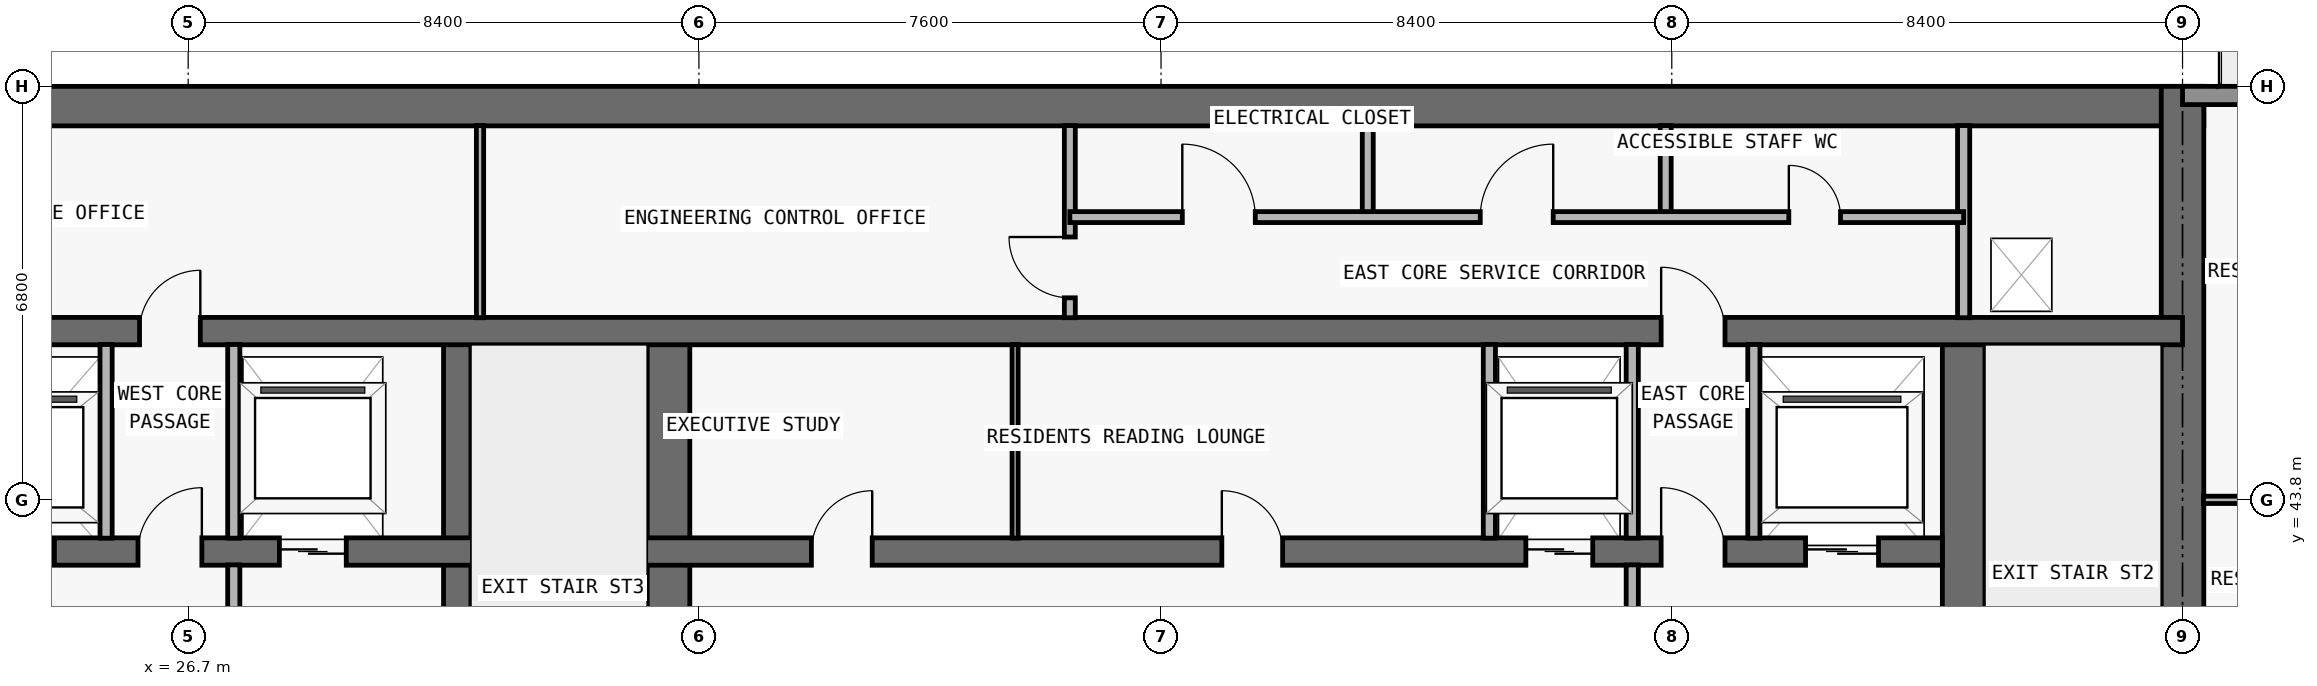
"""IFC4 building model, lengths in metres.
Left out: names, types, materials, properties, quantities, classifications, styles, units other than length and angle.
Written with IfcOpenShell. Run it as: python <this file> out.ifc"""

import sys

from ifc_helpers import new_model, si_unit, direction, frame, frame_2d, origin, place, context, subcontext, project, spatial, rectangle, extrude, element, fill, save


model = new_model("IFC4")
c1 = context("Model", 3, precision=1e-05, world=origin(), true_north=direction((0.0, 1.0)))
c2 = subcontext(c1, "Body", "Model", "MODEL_VIEW")
j1 = project(units=[si_unit("LENGTHUNIT", "METRE"), si_unit("PLANEANGLEUNIT", "RADIAN")], contexts=[c1])
p1 = place(None, origin())
s1 = spatial("IfcSite", under=j1, at=p1, CompositionType="ELEMENT")
p2 = place(p1, origin())
s2 = spatial("IfcBuilding", under=s1, at=p2, CompositionType="ELEMENT")
p3 = place(p2, frame((0.0, 0.0, 266.1)))
s3 = spatial("IfcBuildingStorey", under=s2, at=p3, CompositionType="ELEMENT", Elevation=266.1)
p4 = place(p3, frame((17.95, 50.275, 0.0), z_axis=(0.0, 0.0, 1.0), x_axis=(1.0, 0.0, 0.0)))
e1 = element("IfcWall", 1, at=p4, inside=s3, PredefinedType="SHEAR", context=c2, shape_type="SweptSolid", body=[
    extrude(rectangle(XDim=41.9, YDim=0.65, at=frame_2d((20.95, 0.0))), origin(), (0.0, 0.0, 1.0), 3.0),
])
p5 = place(p3, frame((59.5, 36.65, 0.0), z_axis=(0.0, 0.0, 1.0), x_axis=(0.0, 1.0, 0.0)))
e2 = element("IfcWall", 2, at=p5, inside=s3, PredefinedType="SHEAR", context=c2, shape_type="SweptSolid", body=[
    extrude(rectangle(XDim=13.95, YDim=0.7, at=frame_2d((6.975, 0.0))), origin(), (0.0, 0.0, 1.0), 3.0),
])
p6 = place(p3, frame((55.9, 37.0, 0.0), z_axis=(0.0, 0.0, 1.0), x_axis=(0.0, 1.0, 0.0)))
e3 = element("IfcWall", 3, at=p6, inside=s3, PredefinedType="SHEAR", context=c2, shape_type="SweptSolid", body=[
    extrude(rectangle(XDim=9.575, YDim=0.7, at=frame_2d((4.788, 0.0))), origin(), (0.0, 0.0, 1.0), 3.0),
])
p7 = place(p6, frame((0.55, 0.0, 0.0)))
e4 = element("IfcOpeningElement", 4, at=p7, cuts=e3, PredefinedType="OPENING", context=c2, shape_type="SweptSolid", body=[
    extrude(rectangle(XDim=1.1, YDim=2.15, at=frame_2d((0.55, 1.075))), frame((0.0, 0.36, 0.0), z_axis=(0.0, -1.0, 0.0), x_axis=(1.0, 0.0, 0.0)), (0.0, 0.0, 1.0), 0.72),
])
p8 = place(p3, frame((31.125, 37.0, 0.0), z_axis=(0.0, 0.0, 1.0), x_axis=(0.0, 1.0, 0.0)))
e5 = element("IfcWall", 5, at=p8, inside=s3, PredefinedType="SHEAR", context=c2, shape_type="SweptSolid", body=[
    extrude(rectangle(XDim=9.575, YDim=0.45, at=frame_2d((4.788, 0.0))), origin(), (0.0, 0.0, 1.0), 3.0),
])
p9 = place(p3, frame((34.6, 37.0, 0.0), z_axis=(0.0, 0.0, 1.0), x_axis=(0.0, 1.0, 0.0)))
e6 = element("IfcWall", 6, at=p9, inside=s3, PredefinedType="SHEAR", context=c2, shape_type="SweptSolid", body=[
    extrude(rectangle(XDim=9.575, YDim=0.7, at=frame_2d((4.788, 0.0))), origin(), (0.0, 0.0, 1.0), 3.0),
])
p10 = place(p3, frame((22.25, 42.95, 0.0), z_axis=(0.0, 0.0, 1.0), x_axis=(1.0, 0.0, 0.0)))
e7 = element("IfcWall", 7, at=p10, inside=s3, PredefinedType="SHEAR", context=c2, shape_type="SweptSolid", body=[
    extrude(rectangle(XDim=33.3, YDim=0.45, at=frame_2d((16.65, 0.0))), origin(), (0.0, 0.0, 1.0), 3.0),
])
p11 = place(p10, frame((1.05, 0.0, 0.0)))
e8 = element("IfcOpeningElement", 8, at=p11, cuts=e7, PredefinedType="OPENING", context=c2, shape_type="SweptSolid", body=[
    extrude(rectangle(XDim=1.2, YDim=2.2, at=frame_2d((0.6, 1.1))), frame((0.0, 0.235, 0.0), z_axis=(0.0, -1.0, 0.0), x_axis=(1.0, 0.0, 0.0)), (0.0, 0.0, 1.0), 0.47),
])
p12 = place(p10, frame((31.05, 0.0, 0.0)))
e9 = element("IfcOpeningElement", 9, at=p12, cuts=e7, PredefinedType="OPENING", context=c2, shape_type="SweptSolid", body=[
    extrude(rectangle(XDim=1.2, YDim=2.2, at=frame_2d((0.6, 1.1))), frame((0.0, 0.235, 0.0), z_axis=(0.0, -1.0, 0.0), x_axis=(1.0, 0.0, 0.0)), (0.0, 0.0, 1.0), 0.47),
])
p13 = place(p10, frame((26.45, 0.0, 0.0)))
e10 = element("IfcOpeningElement", 10, at=p13, cuts=e7, PredefinedType="OPENING", context=c2, shape_type="SweptSolid", body=[
    extrude(rectangle(XDim=1.1, YDim=2.2, at=frame_2d((0.55, 1.1))), frame((0.0, 0.235, 0.0), z_axis=(0.0, -1.0, 0.0), x_axis=(1.0, 0.0, 0.0)), (0.0, 0.0, 1.0), 0.47),
])
p14 = place(p10, frame((5.95, 0.0, 0.0)))
e11 = element("IfcOpeningElement", 11, at=p14, cuts=e7, PredefinedType="OPENING", context=c2, shape_type="SweptSolid", body=[
    extrude(rectangle(XDim=1.1, YDim=2.2, at=frame_2d((0.55, 1.1))), frame((0.0, 0.235, 0.0), z_axis=(0.0, -1.0, 0.0), x_axis=(1.0, 0.0, 0.0)), (0.0, 0.0, 1.0), 0.47),
])
p15 = place(p10, frame((3.625, 0.0, 0.0)))
e12 = element("IfcOpeningElement", 12, at=p15, cuts=e7, PredefinedType="OPENING", context=c2, shape_type="SweptSolid", body=[
    extrude(rectangle(XDim=1.05, YDim=2.15, at=frame_2d((0.525, 1.075))), frame((0.0, 0.235, 0.0), z_axis=(0.0, -1.0, 0.0), x_axis=(1.0, 0.0, 0.0)), (0.0, 0.0, 1.0), 0.47),
])
p16 = place(p10, frame((28.675, 0.0, 0.0)))
e13 = element("IfcOpeningElement", 13, at=p16, cuts=e7, PredefinedType="OPENING", context=c2, shape_type="SweptSolid", body=[
    extrude(rectangle(XDim=1.05, YDim=2.15, at=frame_2d((0.525, 1.075))), frame((0.0, 0.235, 0.0), z_axis=(0.0, -1.0, 0.0), x_axis=(1.0, 0.0, 0.0)), (0.0, 0.0, 1.0), 0.47),
])
p17 = place(p10, frame((14.7, 0.0, 0.0)))
e14 = element("IfcOpeningElement", 14, at=p17, cuts=e7, PredefinedType="OPENING", context=c2, shape_type="SweptSolid", body=[
    extrude(rectangle(XDim=1.0, YDim=2.2, at=frame_2d((0.5, 1.1))), frame((0.0, 0.235, 0.0), z_axis=(0.0, -1.0, 0.0), x_axis=(1.0, 0.0, 0.0)), (0.0, 0.0, 1.0), 0.47),
])
p18 = place(p10, frame((21.45, 0.0, 0.0)))
e15 = element("IfcOpeningElement", 15, at=p18, cuts=e7, PredefinedType="OPENING", context=c2, shape_type="SweptSolid", body=[
    extrude(rectangle(XDim=1.0, YDim=2.2, at=frame_2d((0.5, 1.1))), frame((0.0, 0.235, 0.0), z_axis=(0.0, -1.0, 0.0), x_axis=(1.0, 0.0, 0.0)), (0.0, 0.0, 1.0), 0.47),
])
p19 = place(p3, frame((18.3, 46.575, 0.0), z_axis=(0.0, 0.0, 1.0), x_axis=(1.0, 0.0, 0.0)))
e16 = element("IfcWall", 16, at=p19, inside=s3, PredefinedType="SHEAR", context=c2, shape_type="SweptSolid", body=[
    extrude(rectangle(XDim=41.2, YDim=0.45, at=frame_2d((20.6, 0.0))), origin(), (0.0, 0.0, 1.0), 3.0),
])
p20 = place(p19, frame((7.6, 0.0, 0.0)))
e17 = element("IfcOpeningElement", 17, at=p20, cuts=e16, PredefinedType="OPENING", context=c2, shape_type="SweptSolid", body=[
    extrude(rectangle(XDim=1.0, YDim=2.2, at=frame_2d((0.5, 1.1))), frame((0.0, 0.235, 0.0), z_axis=(0.0, -1.0, 0.0), x_axis=(1.0, 0.0, 0.0)), (0.0, 0.0, 1.0), 0.47),
])
p21 = place(p19, frame((32.625, 0.0, 0.0)))
e18 = element("IfcOpeningElement", 18, at=p21, cuts=e16, PredefinedType="OPENING", context=c2, shape_type="SweptSolid", body=[
    extrude(rectangle(XDim=1.05, YDim=2.15, at=frame_2d((0.525, 1.075))), frame((0.0, 0.235, 0.0), z_axis=(0.0, -1.0, 0.0), x_axis=(1.0, 0.0, 0.0)), (0.0, 0.0, 1.0), 0.47),
])
p22 = place(p3, frame((59.5, 50.45, 0.0), z_axis=(0.0, 0.0, 1.0), x_axis=(1.0, 0.0, 0.0)))
e19 = element("IfcWall", 19, at=p22, inside=s3, PredefinedType="STANDARD", context=c2, shape_type="SweptSolid", body=[
    extrude(rectangle(XDim=6.2, YDim=0.3, at=frame_2d((3.1, 0.0))), origin(), (0.0, 0.0, 1.0), 3.0),
])
p23 = place(p22, frame((2.1, 0.0, 0.0)))
e20 = element("IfcOpeningElement", 20, at=p23, cuts=e19, PredefinedType="OPENING", context=c2, shape_type="SweptSolid", body=[
    extrude(rectangle(XDim=2.0, YDim=2.3, at=frame_2d((1.0, 1.15))), frame((0.0, 0.16, 0.0), z_axis=(0.0, -1.0, 0.0), x_axis=(1.0, 0.0, 0.0)), (0.0, 0.0, 1.0), 0.32),
])
p24 = place(p3, frame((25.35, 43.17, 0.0), z_axis=(0.0, 0.0, 1.0), x_axis=(0.0, 1.0, 0.0)))
e21 = element("IfcWall", 21, at=p24, inside=s3, PredefinedType="PARTITIONING", context=c2, shape_type="SweptSolid", body=[
    extrude(rectangle(XDim=3.185, YDim=0.2, at=frame_2d((1.593, 0.0))), origin(), (0.0, 0.0, 1.0), 3.0),
])
p25 = place(p3, frame((27.45, 37.345, 0.0), z_axis=(0.0, 0.0, 1.0), x_axis=(0.0, 1.0, 0.0)))
e22 = element("IfcWall", 22, at=p25, inside=s3, PredefinedType="PARTITIONING", context=c2, shape_type="SweptSolid", body=[
    extrude(rectangle(XDim=5.385, YDim=0.2, at=frame_2d((2.692, 0.0))), origin(), (0.0, 0.0, 1.0), 3.0),
])
p26 = place(p3, frame((27.45, 43.17, 0.0), z_axis=(0.0, 0.0, 1.0), x_axis=(0.0, 1.0, 0.0)))
e23 = element("IfcWall", 23, at=p26, inside=s3, PredefinedType="PARTITIONING", context=c2, shape_type="SweptSolid", body=[
    extrude(rectangle(XDim=3.185, YDim=0.2, at=frame_2d((1.593, 0.0))), origin(), (0.0, 0.0, 1.0), 3.0),
])
p27 = place(p3, frame((31.5, 46.795, 0.0), z_axis=(0.0, 0.0, 1.0), x_axis=(0.0, 1.0, 0.0)))
e24 = element("IfcWall", 24, at=p27, inside=s3, PredefinedType="PARTITIONING", context=c2, shape_type="SweptSolid", body=[
    extrude(rectangle(XDim=3.16, YDim=0.12, at=frame_2d((1.58, 0.0))), origin(), (0.0, 0.0, 1.0), 3.0),
])
p28 = place(p3, frame((40.3, 43.17, 0.0), z_axis=(0.0, 0.0, 1.0), x_axis=(0.0, 1.0, 0.0)))
e25 = element("IfcWall", 25, at=p28, inside=s3, PredefinedType="MOVABLE", context=c2, shape_type="SweptSolid", body=[
    extrude(rectangle(XDim=3.185, YDim=0.1, at=frame_2d((1.593, 0.0))), origin(), (0.0, 0.0, 1.0), 3.0),
])
p29 = place(p3, frame((41.2, 46.795, 0.0), z_axis=(0.0, 0.0, 1.0), x_axis=(0.0, 1.0, 0.0)))
e26 = element("IfcWall", 26, at=p29, inside=s3, PredefinedType="PARTITIONING", context=c2, shape_type="SweptSolid", body=[
    extrude(rectangle(XDim=3.16, YDim=0.18, at=frame_2d((1.58, 0.0))), origin(), (0.0, 0.0, 1.0), 3.0),
])
p30 = place(p29, frame((0.327, 0.0, 0.0)))
e27 = element("IfcOpeningElement", 27, at=p30, cuts=e26, PredefinedType="OPENING", context=c2, shape_type="SweptSolid", body=[
    extrude(rectangle(XDim=1.0, YDim=2.2, at=frame_2d((0.5, 1.1))), frame((0.0, 0.1, 0.0), z_axis=(0.0, -1.0, 0.0), x_axis=(1.0, 0.0, 0.0)), (0.0, 0.0, 1.0), 0.2),
])
p31 = place(p3, frame((46.1, 48.45, 0.0), z_axis=(0.0, 0.0, 1.0), x_axis=(0.0, 1.0, 0.0)))
e28 = element("IfcWall", 28, at=p31, inside=s3, PredefinedType="PARTITIONING", context=c2, shape_type="SweptSolid", body=[
    extrude(rectangle(XDim=1.505, YDim=0.18, at=frame_2d((0.752, 0.0))), origin(), (0.0, 0.0, 1.0), 3.0),
])
p32 = place(p3, frame((48.1, 43.17, 0.0), z_axis=(0.0, 0.0, 1.0), x_axis=(0.0, 1.0, 0.0)))
e29 = element("IfcWall", 29, at=p32, inside=s3, PredefinedType="PARTITIONING", context=c2, shape_type="SweptSolid", body=[
    extrude(rectangle(XDim=3.185, YDim=0.2, at=frame_2d((1.593, 0.0))), origin(), (0.0, 0.0, 1.0), 3.0),
])
p33 = place(p3, frame((50.45, 37.345, 0.0), z_axis=(0.0, 0.0, 1.0), x_axis=(0.0, 1.0, 0.0)))
e30 = element("IfcWall", 30, at=p33, inside=s3, PredefinedType="PARTITIONING", context=c2, shape_type="SweptSolid", body=[
    extrude(rectangle(XDim=5.385, YDim=0.2, at=frame_2d((2.692, 0.0))), origin(), (0.0, 0.0, 1.0), 3.0),
])
p34 = place(p3, frame((50.45, 43.17, 0.0), z_axis=(0.0, 0.0, 1.0), x_axis=(0.0, 1.0, 0.0)))
e31 = element("IfcWall", 31, at=p34, inside=s3, PredefinedType="PARTITIONING", context=c2, shape_type="SweptSolid", body=[
    extrude(rectangle(XDim=3.185, YDim=0.2, at=frame_2d((1.593, 0.0))), origin(), (0.0, 0.0, 1.0), 3.0),
])
p35 = place(p3, frame((51.0, 48.45, 0.0), z_axis=(0.0, 0.0, 1.0), x_axis=(0.0, 1.0, 0.0)))
e32 = element("IfcWall", 32, at=p35, inside=s3, PredefinedType="PARTITIONING", context=c2, shape_type="SweptSolid", body=[
    extrude(rectangle(XDim=1.505, YDim=0.18, at=frame_2d((0.752, 0.0))), origin(), (0.0, 0.0, 1.0), 3.0),
])
p36 = place(p3, frame((52.45, 43.17, 0.0), z_axis=(0.0, 0.0, 1.0), x_axis=(0.0, 1.0, 0.0)))
e33 = element("IfcWall", 33, at=p36, inside=s3, PredefinedType="PARTITIONING", context=c2, shape_type="SweptSolid", body=[
    extrude(rectangle(XDim=3.185, YDim=0.2, at=frame_2d((1.593, 0.0))), origin(), (0.0, 0.0, 1.0), 3.0),
])
p37 = place(p3, frame((55.9, 46.795, 0.0), z_axis=(0.0, 0.0, 1.0), x_axis=(0.0, 1.0, 0.0)))
e34 = element("IfcWall", 34, at=p37, inside=s3, PredefinedType="PARTITIONING", context=c2, shape_type="SweptSolid", body=[
    extrude(rectangle(XDim=3.16, YDim=0.2, at=frame_2d((1.58, 0.0))), origin(), (0.0, 0.0, 1.0), 3.0),
])
p38 = place(p3, frame((59.845, 43.8, 0.0), z_axis=(0.0, 0.0, 1.0), x_axis=(1.0, 0.0, 0.0)))
e35 = element("IfcWall", 35, at=p38, inside=s3, PredefinedType="PARTITIONING", context=c2, shape_type="SweptSolid", body=[
    extrude(rectangle(XDim=9.56, YDim=0.12, at=frame_2d((4.78, 0.0))), origin(), (0.0, 0.0, 1.0), 2.368),
])
p39 = place(p38, frame((3.63, 0.0, 0.0)))
e36 = element("IfcOpeningElement", 36, at=p39, cuts=e35, PredefinedType="OPENING", context=c2, shape_type="SweptSolid", body=[
    extrude(rectangle(XDim=0.9, YDim=2.15, at=frame_2d((0.45, 1.075))), frame((0.0, 0.07, 0.0), z_axis=(0.0, -1.0, 0.0), x_axis=(1.0, 0.0, 0.0)), (0.0, 0.0, 1.0), 0.14),
])
p40 = place(p38, frame((0.728, 0.0, 0.0)))
e37 = element("IfcOpeningElement", 37, at=p40, cuts=e35, PredefinedType="OPENING", context=c2, shape_type="SweptSolid", body=[
    extrude(rectangle(XDim=0.85, YDim=2.1, at=frame_2d((0.425, 1.05))), frame((0.0, 0.07, 0.0), z_axis=(0.0, -1.0, 0.0), x_axis=(1.0, 0.0, 0.0)), (0.0, 0.0, 1.0), 0.14),
])
p41 = place(p3, frame((41.2, 48.45, 0.0), z_axis=(0.0, 0.0, 1.0), x_axis=(1.0, 0.0, 0.0)))
e38 = element("IfcWall", 38, at=p41, inside=s3, PredefinedType="PARTITIONING", context=c2, shape_type="SweptSolid", body=[
    extrude(rectangle(XDim=14.7, YDim=0.18, at=frame_2d((7.35, 0.0))), origin(), (0.0, 0.0, 1.0), 3.0),
])
p42 = place(p41, frame((1.85, 0.0, 0.0)))
e39 = element("IfcOpeningElement", 39, at=p42, cuts=e38, PredefinedType="OPENING", context=c2, shape_type="SweptSolid", body=[
    extrude(rectangle(XDim=1.2, YDim=2.2, at=frame_2d((0.6, 1.1))), frame((0.0, 0.1, 0.0), z_axis=(0.0, -1.0, 0.0), x_axis=(1.0, 0.0, 0.0)), (0.0, 0.0, 1.0), 0.2),
])
p43 = place(p41, frame((6.75, 0.0, 0.0)))
e40 = element("IfcOpeningElement", 40, at=p43, cuts=e38, PredefinedType="OPENING", context=c2, shape_type="SweptSolid", body=[
    extrude(rectangle(XDim=1.2, YDim=2.2, at=frame_2d((0.6, 1.1))), frame((0.0, 0.1, 0.0), z_axis=(0.0, -1.0, 0.0), x_axis=(1.0, 0.0, 0.0)), (0.0, 0.0, 1.0), 0.2),
])
p44 = place(p41, frame((11.825, 0.0, 0.0)))
e41 = element("IfcOpeningElement", 41, at=p44, cuts=e38, PredefinedType="OPENING", context=c2, shape_type="SweptSolid", body=[
    extrude(rectangle(XDim=0.85, YDim=2.1, at=frame_2d((0.425, 1.05))), frame((0.0, 0.1, 0.0), z_axis=(0.0, -1.0, 0.0), x_axis=(1.0, 0.0, 0.0)), (0.0, 0.0, 1.0), 0.2),
])
p45 = place(p11, origin())
e42 = element("IfcDoor", 42, at=p45, inside=s3, OperationType="DOUBLE_DOOR_SLIDING", PredefinedType="DOOR", context=c2, shape_type="SweptSolid", body=[
    extrude(rectangle(XDim=1.2, YDim=2.2, at=frame_2d((0.6, 1.1))), frame((0.0, 0.025, 0.0), z_axis=(0.0, -1.0, 0.0), x_axis=(1.0, 0.0, 0.0)), (0.0, 0.0, 1.0), 0.05),
])
fill(e8, e42)
p46 = place(p12, origin())
e43 = element("IfcDoor", 43, at=p46, inside=s3, OperationType="DOUBLE_DOOR_SLIDING", PredefinedType="DOOR", context=c2, shape_type="SweptSolid", body=[
    extrude(rectangle(XDim=1.2, YDim=2.2, at=frame_2d((0.6, 1.1))), frame((0.0, 0.025, 0.0), z_axis=(0.0, -1.0, 0.0), x_axis=(1.0, 0.0, 0.0)), (0.0, 0.0, 1.0), 0.05),
])
fill(e9, e43)
p47 = place(p13, origin())
e44 = element("IfcDoor", 44, at=p47, inside=s3, OperationType="DOUBLE_DOOR_SLIDING", PredefinedType="DOOR", context=c2, shape_type="SweptSolid", body=[
    extrude(rectangle(XDim=1.1, YDim=2.2, at=frame_2d((0.55, 1.1))), frame((0.0, 0.025, 0.0), z_axis=(0.0, -1.0, 0.0), x_axis=(1.0, 0.0, 0.0)), (0.0, 0.0, 1.0), 0.05),
])
fill(e10, e44)
p48 = place(p14, origin())
e45 = element("IfcDoor", 45, at=p48, inside=s3, OperationType="DOUBLE_DOOR_SLIDING", PredefinedType="DOOR", context=c2, shape_type="SweptSolid", body=[
    extrude(rectangle(XDim=1.1, YDim=2.2, at=frame_2d((0.55, 1.1))), frame((0.0, 0.025, 0.0), z_axis=(0.0, -1.0, 0.0), x_axis=(1.0, 0.0, 0.0)), (0.0, 0.0, 1.0), 0.05),
])
fill(e11, e45)
p49 = place(p15, origin())
e46 = element("IfcDoor", 46, at=p49, inside=s3, OperationType="SINGLE_SWING_RIGHT", PredefinedType="DOOR", context=c2, shape_type="SweptSolid", body=[
    extrude(rectangle(XDim=1.05, YDim=2.15, at=frame_2d((0.525, 1.075))), frame((0.0, 0.025, 0.0), z_axis=(0.0, -1.0, 0.0), x_axis=(1.0, 0.0, 0.0)), (0.0, 0.0, 1.0), 0.05),
])
fill(e12, e46)
p50 = place(p16, origin())
e47 = element("IfcDoor", 47, at=p50, inside=s3, OperationType="SINGLE_SWING_LEFT", PredefinedType="DOOR", context=c2, shape_type="SweptSolid", body=[
    extrude(rectangle(XDim=1.05, YDim=2.15, at=frame_2d((0.525, 1.075))), frame((0.0, 0.025, 0.0), z_axis=(0.0, -1.0, 0.0), x_axis=(1.0, 0.0, 0.0)), (0.0, 0.0, 1.0), 0.05),
])
fill(e13, e47)
p51 = place(p17, origin())
e48 = element("IfcDoor", 48, at=p51, inside=s3, OperationType="SINGLE_SWING_RIGHT", PredefinedType="DOOR", context=c2, shape_type="SweptSolid", body=[
    extrude(rectangle(XDim=1.0, YDim=2.2, at=frame_2d((0.5, 1.1))), frame((0.0, 0.025, 0.0), z_axis=(0.0, -1.0, 0.0), x_axis=(1.0, 0.0, 0.0)), (0.0, 0.0, 1.0), 0.05),
])
fill(e14, e48)
p52 = place(p18, origin())
e49 = element("IfcDoor", 49, at=p52, inside=s3, OperationType="SINGLE_SWING_LEFT", PredefinedType="DOOR", context=c2, shape_type="SweptSolid", body=[
    extrude(rectangle(XDim=1.0, YDim=2.2, at=frame_2d((0.5, 1.1))), frame((0.0, 0.025, 0.0), z_axis=(0.0, -1.0, 0.0), x_axis=(1.0, 0.0, 0.0)), (0.0, 0.0, 1.0), 0.05),
])
fill(e15, e49)
p53 = place(p20, origin())
e50 = element("IfcDoor", 50, at=p53, inside=s3, OperationType="SINGLE_SWING_RIGHT", PredefinedType="DOOR", context=c2, shape_type="SweptSolid", body=[
    extrude(rectangle(XDim=1.0, YDim=2.2, at=frame_2d((0.5, 1.1))), frame((0.0, 0.025, 0.0), z_axis=(0.0, -1.0, 0.0), x_axis=(1.0, 0.0, 0.0)), (0.0, 0.0, 1.0), 0.05),
])
fill(e17, e50)
p54 = place(p21, origin())
e51 = element("IfcDoor", 51, at=p54, inside=s3, OperationType="SINGLE_SWING_LEFT", PredefinedType="DOOR", context=c2, shape_type="SweptSolid", body=[
    extrude(rectangle(XDim=1.05, YDim=2.15, at=frame_2d((0.525, 1.075))), frame((0.0, 0.025, 0.0), z_axis=(0.0, -1.0, 0.0), x_axis=(1.0, 0.0, 0.0)), (0.0, 0.0, 1.0), 0.05),
])
fill(e18, e51)
p55 = place(p30, origin())
e52 = element("IfcDoor", 52, at=p55, inside=s3, OperationType="SINGLE_SWING_RIGHT", PredefinedType="DOOR", context=c2, shape_type="SweptSolid", body=[
    extrude(rectangle(XDim=1.0, YDim=2.2, at=frame_2d((0.5, 1.1))), frame((0.0, 0.025, 0.0), z_axis=(0.0, -1.0, 0.0), x_axis=(1.0, 0.0, 0.0)), (0.0, 0.0, 1.0), 0.05),
])
fill(e27, e52)
p56 = place(p42, origin())
e53 = element("IfcDoor", 53, at=p56, inside=s3, OperationType="SINGLE_SWING_LEFT", PredefinedType="DOOR", context=c2, shape_type="SweptSolid", body=[
    extrude(rectangle(XDim=1.2, YDim=2.2, at=frame_2d((0.6, 1.1))), frame((0.0, 0.025, 0.0), z_axis=(0.0, -1.0, 0.0), x_axis=(1.0, 0.0, 0.0)), (0.0, 0.0, 1.0), 0.05),
])
fill(e39, e53)
p57 = place(p43, origin())
e54 = element("IfcDoor", 54, at=p57, inside=s3, OperationType="SINGLE_SWING_RIGHT", PredefinedType="DOOR", context=c2, shape_type="SweptSolid", body=[
    extrude(rectangle(XDim=1.2, YDim=2.2, at=frame_2d((0.6, 1.1))), frame((0.0, 0.025, 0.0), z_axis=(0.0, -1.0, 0.0), x_axis=(1.0, 0.0, 0.0)), (0.0, 0.0, 1.0), 0.05),
])
fill(e40, e54)
p58 = place(p44, origin())
e55 = element("IfcDoor", 55, at=p58, inside=s3, OperationType="SINGLE_SWING_LEFT", PredefinedType="DOOR", context=c2, shape_type="SweptSolid", body=[
    extrude(rectangle(XDim=0.85, YDim=2.1, at=frame_2d((0.425, 1.05))), frame((0.0, 0.025, 0.0), z_axis=(0.0, -1.0, 0.0), x_axis=(1.0, 0.0, 0.0)), (0.0, 0.0, 1.0), 0.05),
])
fill(e41, e55)
save(model, sys.argv[1])
